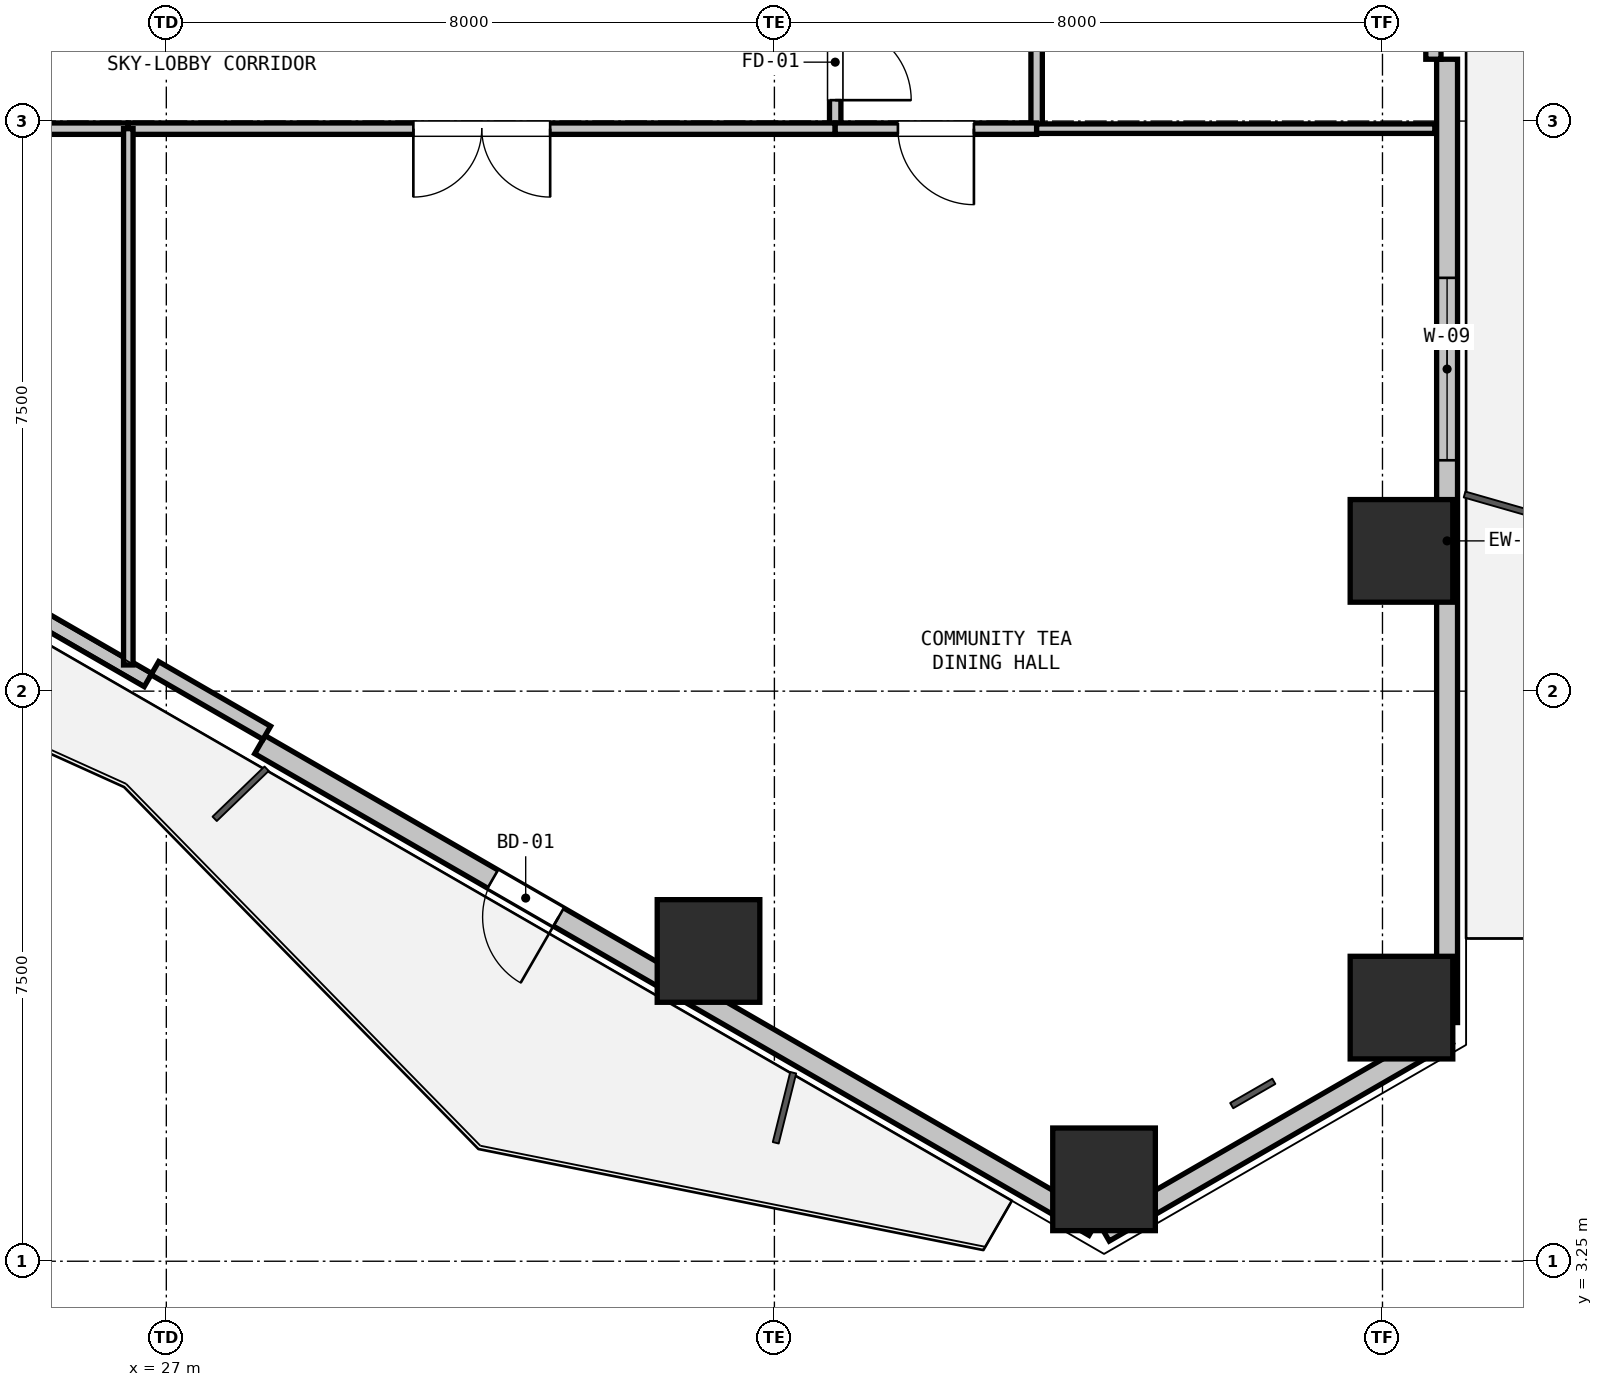
"""IFC4 building model, lengths in metres.
Left out: names, types, materials, properties, quantities, classifications, styles, units other than length and angle.
Written with IfcOpenShell. Run it as: python <this file> out.ifc"""

import sys

from ifc_helpers import new_model, si_unit, direction, frame, frame_2d, origin, origin_2d, place, context, subcontext, project, spatial, rectangle, hollow_rectangle, extrude, element, fill, save


model = new_model("IFC4")
c1 = context("Model", 3, precision=1e-05, world=origin(), true_north=direction((0.0, 1.0)))
c2 = subcontext(c1, "Body", "Model", "MODEL_VIEW")
j1 = project(units=[si_unit("LENGTHUNIT", "METRE"), si_unit("PLANEANGLEUNIT", "RADIAN")], contexts=[c1])
p1 = place(None, origin())
s1 = spatial("IfcSite", under=j1, at=p1, CompositionType="ELEMENT")
p2 = place(p1, origin())
s2 = spatial("IfcBuilding", under=s1, at=p2, CompositionType="ELEMENT")
p3 = place(p2, frame((0.0, 0.0, 62.1)))
s3 = spatial("IfcBuildingStorey", under=s2, at=p3, CompositionType="ELEMENT", Elevation=62.1)
p4 = place(p3, frame((43.25, 12.595, 0.0), z_axis=(0.0, 0.0, 1.0), x_axis=(1.0, 0.0, 0.0)))
e1 = element("IfcColumn", 1, at=p4, inside=s3, PredefinedType="COLUMN", context=c2, shape_type="SweptSolid", body=[
    extrude(hollow_rectangle(XDim=1.35, YDim=1.35, WallThickness=0.036, at=origin_2d()), origin(), (0.0, 0.0, 1.0), 3.13),
])
for number, where, z_axis, x_axis in (
    (2, (43.25, 6.587, 0.0), (0.0, 0.0, 1.0), (1.0, 0.0, 0.0)),
    (3, (39.337, 4.327, 0.0), (0.0, 0.0, 1.0), (1.0, 0.0, 0.0)),
):
    element("IfcColumn", number, at=place(p3, frame(where, z_axis=z_axis, x_axis=x_axis)), inside=s3, PredefinedType="COLUMN", context=c2, shape_type="SweptSolid", body=[
        extrude(hollow_rectangle(XDim=1.35, YDim=1.35, WallThickness=0.036, at=origin_2d()), origin(), (0.0, 0.0, 1.0), 2.88),
    ])
p5 = place(p3, frame((34.133, 7.332, 0.0), z_axis=(0.0, 0.0, 1.0), x_axis=(1.0, 0.0, 0.0)))
e4 = element("IfcColumn", 4, at=p5, inside=s3, PredefinedType="COLUMN", context=c2, shape_type="SweptSolid", body=[
    extrude(hollow_rectangle(XDim=1.35, YDim=1.35, WallThickness=0.036, at=origin_2d()), origin(), (0.0, 0.0, 1.0), 3.13),
])
p6 = place(p3, frame((43.85, 6.24, 0.0), z_axis=(0.0, 0.0, 1.0), x_axis=(-0.866043601342, -0.499968479581, 0.0)))
e5 = element("IfcWall", 5, at=p6, inside=s3, PredefinedType="SOLIDWALL", context=c2, shape_type="SweptSolid", body=[
    extrude(rectangle(XDim=5.211, YDim=0.275, at=frame_2d((2.605, 0.0))), origin(), (0.0, 0.0, 1.0), 4.1),
])
p7 = place(p3, frame((43.85, 19.063, 0.0), z_axis=(0.0, 0.0, 1.0), x_axis=(0.0, -1.0, 0.0)))
e6 = element("IfcWall", 6, at=p7, inside=s3, PredefinedType="SOLIDWALL", context=c2, shape_type="SweptSolid", body=[
    extrude(rectangle(XDim=12.673, YDim=0.275, at=frame_2d((6.336, 0.0))), origin(), (0.0, 0.0, 1.0), 2.865),
])
p8 = place(p7, frame((2.876, 0.0, 0.9)))
e7 = element("IfcOpeningElement", 7, at=p8, cuts=e6, PredefinedType="OPENING", context=c2, shape_type="SweptSolid", body=[
    extrude(rectangle(XDim=2.4, YDim=1.89, at=frame_2d((1.2, 0.945))), frame((0.0, 0.147, 0.0), z_axis=(0.0, -1.0, 0.0), x_axis=(1.0, 0.0, 0.0)), (0.0, 0.0, 1.0), 0.295),
])
p9 = place(p3, frame((43.67, 20.763, 0.0), z_axis=(0.0, 0.0, 1.0), x_axis=(0.0, -1.0, 0.0)))
e8 = element("IfcWall", 8, at=p9, inside=s3, PredefinedType="PARAPET", context=c2, shape_type="SweptSolid", body=[
    extrude(rectangle(XDim=1.7, YDim=0.2, at=frame_2d((0.85, 0.0))), origin(), (0.0, 0.0, 1.0), 4.1),
])
p10 = place(p3, frame((39.207, 3.71, 0.0), z_axis=(0.0, 0.0, 1.0), x_axis=(-0.86603192154, 0.499988710747, 0.0)))
e9 = element("IfcWall", 9, at=p10, inside=s3, PredefinedType="SOLIDWALL", context=c2, shape_type="SweptSolid", body=[
    extrude(rectangle(XDim=12.673, YDim=0.275, at=frame_2d((6.336, 0.0))), origin(), (0.0, 0.0, 1.0), 2.865),
])
p11 = place(p10, frame((8.136, 0.0, 0.0)))
e10 = element("IfcOpeningElement", 10, at=p11, cuts=e9, PredefinedType="OPENING", context=c2, shape_type="SweptSolid", body=[
    extrude(rectangle(XDim=1.0, YDim=2.1, at=frame_2d((0.5, 1.05))), frame((0.0, 0.147, 0.0), z_axis=(0.0, -1.0, 0.0), x_axis=(1.0, 0.0, 0.0)), (0.0, 0.0, 1.0), 0.295),
])
p12 = place(p3, frame((26.76, 10.896, 0.0), z_axis=(0.0, 0.0, 1.0), x_axis=(-0.866027351828, 0.499996625875, 0.0)))
e11 = element("IfcWall", 11, at=p12, inside=s3, PredefinedType="PARAPET", context=c2, shape_type="SweptSolid", body=[
    extrude(rectangle(XDim=11.973, YDim=0.2, at=frame_2d((5.987, 0.0))), origin(), (0.0, 0.0, 1.0), 0.2),
])
p13 = place(p3, frame((28.322, 10.202, 0.0), z_axis=(0.0, 0.0, 1.0), x_axis=(-0.86605165483, 0.499954529098, 0.0)))
e12 = element("IfcWall", 12, at=p13, inside=s3, PredefinedType="PARAPET", context=c2, shape_type="SweptSolid", body=[
    extrude(rectangle(XDim=1.7, YDim=0.2, at=frame_2d((0.85, 0.0))), origin(), (0.0, 0.0, 1.0), 4.1),
])
p14 = place(p3, frame((35.8, 19.9, 0.0), z_axis=(0.0, 0.0, 1.0), x_axis=(0.0, -1.0, 0.0)))
e13 = element("IfcWall", 13, at=p14, inside=s3, PredefinedType="PARTITIONING", context=c2, shape_type="SweptSolid", body=[
    extrude(rectangle(XDim=1.75, YDim=0.15, at=frame_2d((0.875, 0.0))), origin(), (0.0, 0.0, 1.0), 3.115),
])
p15 = place(p14, frame((0.375, 0.0, 0.0)))
e14 = element("IfcOpeningElement", 14, at=p15, cuts=e13, PredefinedType="OPENING", context=c2, shape_type="SweptSolid", body=[
    extrude(rectangle(XDim=1.0, YDim=2.15, at=frame_2d((0.5, 1.075))), frame((0.0, 0.085, 0.0), z_axis=(0.0, -1.0, 0.0), x_axis=(1.0, 0.0, 0.0)), (0.0, 0.0, 1.0), 0.17),
])
p16 = place(p3, frame((35.8, 18.15, 0.0), z_axis=(0.0, 0.0, 1.0), x_axis=(-1.0, 0.0, 0.0)))
e15 = element("IfcWall", 15, at=p16, inside=s3, PredefinedType="PARTITIONING", context=c2, shape_type="SweptSolid", body=[
    extrude(rectangle(XDim=9.3, YDim=0.15, at=frame_2d((4.65, 0.0))), origin(), (0.0, 0.0, 1.0), 2.865),
])
p17 = place(p16, frame((3.75, 0.0, 0.0)))
e16 = element("IfcOpeningElement", 16, at=p17, cuts=e15, PredefinedType="OPENING", context=c2, shape_type="SweptSolid", body=[
    extrude(rectangle(XDim=1.8, YDim=2.2, at=frame_2d((0.9, 1.1))), frame((0.0, 0.085, 0.0), z_axis=(0.0, -1.0, 0.0), x_axis=(1.0, 0.0, 0.0)), (0.0, 0.0, 1.0), 0.17),
])
p18 = place(p3, frame((26.5, 18.15, 0.0), z_axis=(0.0, 0.0, 1.0), x_axis=(-1.0, 0.0, 0.0)))
e17 = element("IfcWall", 17, at=p18, inside=s3, PredefinedType="PARTITIONING", context=c2, shape_type="SweptSolid", body=[
    extrude(rectangle(XDim=6.85, YDim=0.15, at=frame_2d((3.425, 0.0))), origin(), (0.0, 0.0, 1.0), 4.48),
])
p19 = place(p18, frame((2.925, 0.0, 0.0)))
e18 = element("IfcOpeningElement", 18, at=p19, cuts=e17, PredefinedType="OPENING", context=c2, shape_type="SweptSolid", body=[
    extrude(rectangle(XDim=1.0, YDim=2.15, at=frame_2d((0.5, 1.075))), frame((0.0, 0.085, 0.0), z_axis=(0.0, -1.0, 0.0), x_axis=(1.0, 0.0, 0.0)), (0.0, 0.0, 1.0), 0.17),
])
p20 = place(p3, frame((38.45, 35.35, 0.0), z_axis=(0.0, 0.0, 1.0), x_axis=(0.0, -1.0, 0.0)))
e19 = element("IfcWall", 19, at=p20, inside=s3, PredefinedType="PARTITIONING", context=c2, shape_type="SweptSolid", body=[
    extrude(rectangle(XDim=17.2, YDim=0.15, at=frame_2d((8.6, 0.0))), origin(), (0.0, 0.0, 1.0), 3.115),
])
p21 = place(p20, frame((8.1, 0.0, 0.0)))
e20 = element("IfcOpeningElement", 20, at=p21, cuts=e19, PredefinedType="OPENING", context=c2, shape_type="SweptSolid", body=[
    extrude(rectangle(XDim=1.0, YDim=2.15, at=frame_2d((0.5, 1.075))), frame((0.0, 0.085, 0.0), z_axis=(0.0, -1.0, 0.0), x_axis=(1.0, 0.0, 0.0)), (0.0, 0.0, 1.0), 0.17),
])
p22 = place(p3, frame((38.45, 18.15, 0.0), z_axis=(0.0, 0.0, 1.0), x_axis=(-1.0, 0.0, 0.0)))
e21 = element("IfcWall", 21, at=p22, inside=s3, PredefinedType="PARTITIONING", context=c2, shape_type="SweptSolid", body=[
    extrude(rectangle(XDim=2.65, YDim=0.15, at=frame_2d((1.325, 0.0))), origin(), (0.0, 0.0, 1.0), 3.115),
])
p23 = place(p22, frame((0.825, 0.0, 0.0)))
e22 = element("IfcOpeningElement", 22, at=p23, cuts=e21, PredefinedType="OPENING", context=c2, shape_type="SweptSolid", body=[
    extrude(rectangle(XDim=1.0, YDim=2.15, at=frame_2d((0.5, 1.075))), frame((0.0, 0.085, 0.0), z_axis=(0.0, -1.0, 0.0), x_axis=(1.0, 0.0, 0.0)), (0.0, 0.0, 1.0), 0.17),
])
p24 = place(p3, frame((26.5, 18.15, 0.0), z_axis=(0.0, 0.0, 1.0), x_axis=(0.0, -1.0, 0.0)))
e23 = element("IfcWall", 23, at=p24, inside=s3, PredefinedType="PARTITIONING", context=c2, shape_type="SweptSolid", body=[
    extrude(rectangle(XDim=7.055, YDim=0.125, at=frame_2d((3.528, 0.0))), origin(), (0.0, 0.0, 1.0), 2.365),
])
p25 = place(p3, frame((43.688, 18.15, 0.0), z_axis=(0.0, 0.0, 1.0), x_axis=(-1.0, 0.0, 0.0)))
e24 = element("IfcWall", 24, at=p25, inside=s3, PredefinedType="PARTITIONING", context=c2, shape_type="SweptSolid", body=[
    extrude(rectangle(XDim=5.239, YDim=0.125, at=frame_2d((2.619, 0.0))), origin(), (0.0, 0.0, 1.0), 2.365),
])
p26 = place(p8, origin())
e25 = element("IfcWindow", 25, at=p26, inside=s3, PartitioningType="SINGLE_PANEL", PredefinedType="WINDOW", context=c2, shape_type="SweptSolid", body=[
    extrude(rectangle(XDim=2.4, YDim=1.89, at=frame_2d((1.2, 0.945))), frame((0.0, 0.03, 0.0), z_axis=(0.0, -1.0, 0.0), x_axis=(1.0, 0.0, 0.0)), (0.0, 0.0, 1.0), 0.06),
])
fill(e7, e25)
p27 = place(p11, origin())
e26 = element("IfcDoor", 26, at=p27, inside=s3, OperationType="SINGLE_SWING_LEFT", PredefinedType="DOOR", context=c2, shape_type="SweptSolid", body=[
    extrude(rectangle(XDim=1.0, YDim=2.1, at=frame_2d((0.5, 1.05))), frame((0.0, 0.025, 0.0), z_axis=(0.0, -1.0, 0.0), x_axis=(1.0, 0.0, 0.0)), (0.0, 0.0, 1.0), 0.05),
])
fill(e10, e26)
p28 = place(p15, origin())
e27 = element("IfcDoor", 27, at=p28, inside=s3, OperationType="SINGLE_SWING_RIGHT", PredefinedType="DOOR", context=c2, shape_type="SweptSolid", body=[
    extrude(rectangle(XDim=1.0, YDim=2.15, at=frame_2d((0.5, 1.075))), frame((0.0, 0.025, 0.0), z_axis=(0.0, -1.0, 0.0), x_axis=(1.0, 0.0, 0.0)), (0.0, 0.0, 1.0), 0.05),
])
fill(e14, e27)
p29 = place(p17, origin())
e28 = element("IfcDoor", 28, at=p29, inside=s3, OperationType="DOUBLE_DOOR_SINGLE_SWING", PredefinedType="DOOR", context=c2, shape_type="SweptSolid", body=[
    extrude(rectangle(XDim=1.8, YDim=2.2, at=frame_2d((0.9, 1.1))), frame((0.0, 0.025, 0.0), z_axis=(0.0, -1.0, 0.0), x_axis=(1.0, 0.0, 0.0)), (0.0, 0.0, 1.0), 0.05),
])
fill(e16, e28)
p30 = place(p23, origin())
e29 = element("IfcDoor", 29, at=p30, inside=s3, OperationType="SINGLE_SWING_LEFT", PredefinedType="DOOR", context=c2, shape_type="SweptSolid", body=[
    extrude(rectangle(XDim=1.0, YDim=2.15, at=frame_2d((0.5, 1.075))), frame((0.0, 0.025, 0.0), z_axis=(0.0, -1.0, 0.0), x_axis=(1.0, 0.0, 0.0)), (0.0, 0.0, 1.0), 0.05),
])
fill(e22, e29)
save(model, sys.argv[1])
